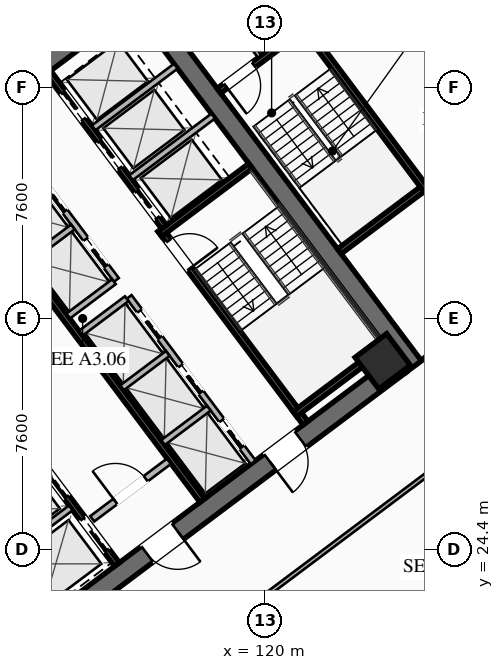
"""IFC4 building model, lengths in metres.
Left out: names, types, materials, properties, quantities, classifications, styles, units other than length and angle.
Written with IfcOpenShell. Run it as: python <this file> out.ifc"""

import sys

from ifc_helpers import new_model, si_unit, direction, frame, frame_2d, origin, origin_2d, place, context, subcontext, project, spatial, rectangle, hollow_rectangle, extrude, element, fill, save


model = new_model("IFC4")
c1 = context("Model", 3, precision=1e-05, world=origin(), true_north=direction((0.0, 1.0)))
c2 = subcontext(c1, "Body", "Model", "MODEL_VIEW")
j1 = project(units=[si_unit("LENGTHUNIT", "METRE"), si_unit("PLANEANGLEUNIT", "RADIAN")], contexts=[c1])
p1 = place(None, origin())
s1 = spatial("IfcSite", under=j1, at=p1, CompositionType="ELEMENT")
p2 = place(p1, origin())
s2 = spatial("IfcBuilding", under=s1, at=p2, CompositionType="ELEMENT")
p3 = place(p2, frame((0.0, 0.0, 106.25)))
s3 = spatial("IfcBuildingStorey", under=s2, at=p3, CompositionType="ELEMENT", Elevation=106.25)
p4 = place(p3, frame((115.524, 42.893, 0.0), z_axis=(0.0, 0.0, 1.0), x_axis=(0.600005007985, -0.799996243986, 0.0)))
e1 = element("IfcWall", 1, at=p4, inside=s3, PredefinedType="SHEAR", context=c2, shape_type="SweptSolid", body=[
    extrude(rectangle(XDim=15.6, YDim=0.65, at=frame_2d((7.8, 0.0))), origin(), (0.0, 0.0, 1.0), 3.55),
])
p5 = place(p3, frame((124.429, 30.478, 0.0), z_axis=(0.0, 0.0, 1.0), x_axis=(-0.799998028465, -0.600002628705, 0.0)))
e2 = element("IfcWall", 2, at=p5, inside=s3, PredefinedType="SHEAR", context=c2, shape_type="SweptSolid", body=[
    extrude(rectangle(XDim=14.86, YDim=0.65, at=frame_2d((7.43, 0.0))), origin(), (0.0, 0.0, 1.0), 3.55),
])
p6 = place(p5, frame((9.13, 0.0, 0.0)))
e3 = element("IfcOpeningElement", 3, at=p6, cuts=e2, PredefinedType="OPENING", context=c2, shape_type="SweptSolid", body=[
    extrude(rectangle(XDim=1.25, YDim=2.25, at=frame_2d((0.625, 1.125))), frame((0.0, 0.335, 0.0), z_axis=(0.0, -1.0, 0.0), x_axis=(1.0, 0.0, 0.0)), (0.0, 0.0, 1.0), 0.67),
])
p7 = place(p5, frame((4.08, 0.0, 0.0)))
e4 = element("IfcOpeningElement", 4, at=p7, cuts=e2, PredefinedType="OPENING", context=c2, shape_type="SweptSolid", body=[
    extrude(rectangle(XDim=1.25, YDim=2.25, at=frame_2d((0.625, 1.125))), frame((0.0, 0.335, 0.0), z_axis=(0.0, -1.0, 0.0), x_axis=(1.0, 0.0, 0.0)), (0.0, 0.0, 1.0), 0.67),
])
p8 = place(p3, frame((103.571, 33.522, 0.0), z_axis=(0.0, 0.0, 1.0), x_axis=(0.799998028465, 0.600002628705, 0.0)))
e5 = element("IfcWall", 5, at=p8, inside=s3, PredefinedType="SHEAR", context=c2, shape_type="SweptSolid", body=[
    extrude(rectangle(XDim=14.86, YDim=0.65, at=frame_2d((7.43, 0.0))), origin(), (0.0, 0.0, 1.0), 3.55),
])
p9 = place(p8, frame((4.48, 0.0, 0.0)))
e6 = element("IfcOpeningElement", 6, at=p9, cuts=e5, PredefinedType="OPENING", context=c2, shape_type="SweptSolid", body=[
    extrude(rectangle(XDim=1.25, YDim=2.25, at=frame_2d((0.625, 1.125))), frame((0.0, 0.335, 0.0), z_axis=(0.0, -1.0, 0.0), x_axis=(1.0, 0.0, 0.0)), (0.0, 0.0, 1.0), 0.67),
])
p10 = place(p8, frame((9.53, 0.0, 0.0)))
e7 = element("IfcOpeningElement", 7, at=p10, cuts=e5, PredefinedType="OPENING", context=c2, shape_type="SweptSolid", body=[
    extrude(rectangle(XDim=1.25, YDim=2.25, at=frame_2d((0.625, 1.125))), frame((0.0, 0.335, 0.0), z_axis=(0.0, -1.0, 0.0), x_axis=(1.0, 0.0, 0.0)), (0.0, 0.0, 1.0), 0.67),
])
p11 = place(p3, frame((123.87, 30.59, 0.0), z_axis=(0.0, 0.0, 1.0), x_axis=(0.799999996291, 0.600000004945, 0.0)))
e8 = element("IfcColumn", 8, at=p11, inside=s3, PredefinedType="COLUMN", context=c2, shape_type="SweptSolid", body=[
    extrude(hollow_rectangle(XDim=1.3, YDim=1.3, WallThickness=0.05, at=origin_2d()), origin(), (0.0, 0.0, 1.0), 3.25),
])
p12 = place(p3, frame((116.56, 34.92, 0.0), z_axis=(0.0, 0.0, 1.0), x_axis=(0.600009827119, -0.799992629566, 0.0)))
e9 = element("IfcWall", 9, at=p12, inside=s3, PredefinedType="SHEAR", context=c2, shape_type="SweptSolid", body=[
    extrude(rectangle(XDim=7.95, YDim=0.2, at=frame_2d((3.975, 0.0))), origin(), (0.0, 0.0, 1.0), 3.25),
])
p13 = place(p12, frame((0.45, 0.0, 0.0)))
e10 = element("IfcOpeningElement", 10, at=p13, cuts=e9, PredefinedType="OPENING", context=c2, shape_type="SweptSolid", body=[
    extrude(rectangle(XDim=1.15, YDim=2.2, at=frame_2d((0.575, 1.1))), frame((0.0, 0.11, 0.0), z_axis=(0.0, -1.0, 0.0), x_axis=(1.0, 0.0, 0.0)), (0.0, 0.0, 1.0), 0.22),
])
for number, where, z_axis, x_axis in (
    (11, (116.54, 34.78, 0.0), (0.0, 0.0, 1.0), (0.8, 0.6, 0.0)),
    (12, (120.98, 28.86, 0.0), (0.0, 0.0, 1.0), (0.8, 0.6, 0.0)),
):
    element("IfcWall", number, at=place(p3, frame(where, z_axis=z_axis, x_axis=x_axis)), inside=s3, PredefinedType="SHEAR", context=c2, shape_type="SweptSolid", body=[
        extrude(rectangle(XDim=3.73, YDim=0.2, at=frame_2d((1.865, 0.0))), origin(), (0.0, 0.0, 1.0), 3.25),
    ])
p14 = place(p3, frame((117.938, 26.016, 0.0), z_axis=(0.0, 0.0, 1.0), x_axis=(-0.600005463273, 0.799995902516, 0.0)))
e13 = element("IfcWall", 13, at=p14, inside=s3, PredefinedType="SHEAR", context=c2, shape_type="SweptSolid", body=[
    extrude(rectangle(XDim=14.3, YDim=0.2, at=frame_2d((7.15, 0.0))), origin(), (0.0, 0.0, 1.0), 3.25),
])
p15 = place(p3, frame((114.316, 25.412, 0.0), z_axis=(0.0, 0.0, 1.0), x_axis=(0.800018601094, 0.59997519774, 0.0)))
e14 = element("IfcWall", 14, at=p15, inside=s3, PredefinedType="SOLIDWALL", context=c2, shape_type="SweptSolid", body=[
    extrude(rectangle(XDim=3.15, YDim=0.22, at=frame_2d((1.575, 0.0))), origin(), (0.0, 0.0, 1.0), 2.393),
])
p16 = place(p15, frame((0.95, 0.0, 0.0)))
e15 = element("IfcOpeningElement", 15, at=p16, cuts=e14, PredefinedType="OPENING", context=c2, shape_type="SweptSolid", body=[
    extrude(rectangle(XDim=1.25, YDim=2.25, at=frame_2d((0.625, 1.125))), frame((0.0, 0.12, 0.0), z_axis=(0.0, -1.0, 0.0), x_axis=(1.0, 0.0, 0.0)), (0.0, 0.0, 1.0), 0.24),
])
p17 = place(p3, frame((115.13, 23.91, 0.0), z_axis=(0.0, 0.0, 1.0), x_axis=(-0.599975393228, 0.800018454488, 0.0)))
e16 = element("IfcWall", 16, at=p17, inside=s3, PredefinedType="SHEAR", context=c2, shape_type="SweptSolid", body=[
    extrude(rectangle(XDim=6.35, YDim=0.2, at=frame_2d((3.175, 0.0))), origin(), (0.0, 0.0, 1.0), 3.25),
])
p18 = place(p17, frame((4.775, 0.0, 0.0)))
e17 = element("IfcOpeningElement", 17, at=p18, cuts=e16, PredefinedType="OPENING", context=c2, shape_type="SweptSolid", body=[
    extrude(rectangle(XDim=1.3, YDim=2.25, at=frame_2d((0.65, 1.125))), frame((0.0, 0.11, 0.0), z_axis=(0.0, -1.0, 0.0), x_axis=(1.0, 0.0, 0.0)), (0.0, 0.0, 1.0), 0.22),
])
p19 = place(p17, frame((2.775, 0.0, 0.0)))
e18 = element("IfcOpeningElement", 18, at=p19, cuts=e16, PredefinedType="OPENING", context=c2, shape_type="SweptSolid", body=[
    extrude(rectangle(XDim=1.3, YDim=2.25, at=frame_2d((0.65, 1.125))), frame((0.0, 0.11, 0.0), z_axis=(0.0, -1.0, 0.0), x_axis=(1.0, 0.0, 0.0)), (0.0, 0.0, 1.0), 0.22),
])
p20 = place(p17, frame((0.575, 0.0, 0.0)))
e19 = element("IfcOpeningElement", 19, at=p20, cuts=e16, PredefinedType="OPENING", context=c2, shape_type="SweptSolid", body=[
    extrude(rectangle(XDim=1.3, YDim=2.25, at=frame_2d((0.65, 1.125))), frame((0.0, 0.11, 0.0), z_axis=(0.0, -1.0, 0.0), x_axis=(1.0, 0.0, 0.0)), (0.0, 0.0, 1.0), 0.22),
])
p21 = place(p3, frame((110.906, 23.742, 0.0), z_axis=(0.0, 0.0, 1.0), x_axis=(0.8, 0.6, 0.0)))
e20 = element("IfcWall", 20, at=p21, inside=s3, PredefinedType="SOLIDWALL", context=c2, shape_type="SweptSolid", body=[
    extrude(rectangle(XDim=3.38, YDim=0.2, at=frame_2d((1.69, 0.0))), origin(), (0.0, 0.0, 1.0), 3.25),
])
p22 = place(p3, frame((112.87, 40.09, 0.0), z_axis=(0.0, 0.0, 1.0), x_axis=(0.599975393228, -0.800018454488, 0.0)))
e21 = element("IfcWall", 21, at=p22, inside=s3, PredefinedType="SHEAR", context=c2, shape_type="SweptSolid", body=[
    extrude(rectangle(XDim=6.35, YDim=0.2, at=frame_2d((3.175, 0.0))), origin(), (0.0, 0.0, 1.0), 3.25),
])
p23 = place(p22, frame((4.875, 0.0, 0.0)))
e22 = element("IfcOpeningElement", 22, at=p23, cuts=e21, PredefinedType="OPENING", context=c2, shape_type="SweptSolid", body=[
    extrude(rectangle(XDim=1.1, YDim=2.2, at=frame_2d((0.55, 1.1))), frame((0.0, 0.11, 0.0), z_axis=(0.0, -1.0, 0.0), x_axis=(1.0, 0.0, 0.0)), (0.0, 0.0, 1.0), 0.22),
])
p24 = place(p22, frame((2.825, 0.0, 0.0)))
e23 = element("IfcOpeningElement", 23, at=p24, cuts=e21, PredefinedType="OPENING", context=c2, shape_type="SweptSolid", body=[
    extrude(rectangle(XDim=1.1, YDim=2.2, at=frame_2d((0.55, 1.1))), frame((0.0, 0.11, 0.0), z_axis=(0.0, -1.0, 0.0), x_axis=(1.0, 0.0, 0.0)), (0.0, 0.0, 1.0), 0.22),
])
p25 = place(p22, frame((0.825, 0.0, 0.0)))
e24 = element("IfcOpeningElement", 24, at=p25, cuts=e21, PredefinedType="OPENING", context=c2, shape_type="SweptSolid", body=[
    extrude(rectangle(XDim=1.1, YDim=2.2, at=frame_2d((0.55, 1.1))), frame((0.0, 0.11, 0.0), z_axis=(0.0, -1.0, 0.0), x_axis=(1.0, 0.0, 0.0)), (0.0, 0.0, 1.0), 0.22),
])
for number, where, z_axis, x_axis in (
    (25, (115.59, 36.63, 0.0), (0.0, 0.0, 1.0), (0.8, 0.6, 0.0)),
    (26, (114.36, 38.27, 0.0), (0.0, 0.0, 1.0), (0.8, 0.6, 0.0)),
):
    element("IfcWall", number, at=place(p3, frame(where, z_axis=z_axis, x_axis=x_axis)), inside=s3, PredefinedType="SOLIDWALL", context=c2, shape_type="SweptSolid", body=[
        extrude(rectangle(XDim=3.38, YDim=0.2, at=frame_2d((1.69, 0.0))), origin(), (0.0, 0.0, 1.0), 3.25),
    ])
p26 = place(p3, frame((119.61, 27.27, 0.0), z_axis=(0.0, 0.0, 1.0), x_axis=(-0.600011488909, 0.79999138319, 0.0)))
e27 = element("IfcWall", 27, at=p26, inside=s3, PredefinedType="SOLIDWALL", context=c2, shape_type="SweptSolid", body=[
    extrude(rectangle(XDim=6.8, YDim=0.2, at=frame_2d((3.4, 0.0))), origin(), (0.0, 0.0, 1.0), 3.25),
])
p27 = place(p26, frame((0.625, 0.0, 0.0)))
e28 = element("IfcOpeningElement", 28, at=p27, cuts=e27, PredefinedType="OPENING", context=c2, shape_type="SweptSolid", body=[
    extrude(rectangle(XDim=1.1, YDim=2.2, at=frame_2d((0.55, 1.1))), frame((0.0, 0.11, 0.0), z_axis=(0.0, -1.0, 0.0), x_axis=(1.0, 0.0, 0.0)), (0.0, 0.0, 1.0), 0.22),
])
p28 = place(p26, frame((2.875, 0.0, 0.0)))
e29 = element("IfcOpeningElement", 29, at=p28, cuts=e27, PredefinedType="OPENING", context=c2, shape_type="SweptSolid", body=[
    extrude(rectangle(XDim=1.1, YDim=2.2, at=frame_2d((0.55, 1.1))), frame((0.0, 0.11, 0.0), z_axis=(0.0, -1.0, 0.0), x_axis=(1.0, 0.0, 0.0)), (0.0, 0.0, 1.0), 0.22),
])
p29 = place(p26, frame((5.125, 0.0, 0.0)))
e30 = element("IfcOpeningElement", 30, at=p29, cuts=e27, PredefinedType="OPENING", context=c2, shape_type="SweptSolid", body=[
    extrude(rectangle(XDim=1.1, YDim=2.2, at=frame_2d((0.55, 1.1))), frame((0.0, 0.11, 0.0), z_axis=(0.0, -1.0, 0.0), x_axis=(1.0, 0.0, 0.0)), (0.0, 0.0, 1.0), 0.22),
])
p30 = place(p3, frame((116.646, 27.922, 0.0), z_axis=(0.0, 0.0, 1.0), x_axis=(0.8, 0.6, 0.0)))
e31 = element("IfcWall", 31, at=p30, inside=s3, PredefinedType="SOLIDWALL", context=c2, shape_type="SweptSolid", body=[
    extrude(rectangle(XDim=1.88, YDim=0.2, at=frame_2d((0.94, 0.0))), origin(), (0.0, 0.0, 1.0), 3.25),
])
p31 = place(p3, frame((115.296, 29.722, 0.0), z_axis=(0.0, 0.0, 1.0), x_axis=(0.799984418148, 0.600020775241, 0.0)))
e32 = element("IfcWall", 32, at=p31, inside=s3, PredefinedType="SOLIDWALL", context=c2, shape_type="SweptSolid", body=[
    extrude(rectangle(XDim=1.88, YDim=0.2, at=frame_2d((0.94, 0.0))), origin(), (0.0, 0.0, 1.0), 3.25),
])
p32 = place(p3, frame((113.946, 31.522, 0.0), z_axis=(0.0, 0.0, 1.0), x_axis=(0.8, 0.6, 0.0)))
e33 = element("IfcWall", 33, at=p32, inside=s3, PredefinedType="SOLIDWALL", context=c2, shape_type="SweptSolid", body=[
    extrude(rectangle(XDim=1.88, YDim=0.2, at=frame_2d((0.94, 0.0))), origin(), (0.0, 0.0, 1.0), 3.25),
])
p33 = place(p3, frame((115.11, 33.27, 0.0), z_axis=(0.0, 0.0, 1.0), x_axis=(-0.600011488909, 0.79999138319, 0.0)))
e34 = element("IfcWall", 34, at=p33, inside=s3, PredefinedType="SOLIDWALL", context=c2, shape_type="SweptSolid", body=[
    extrude(rectangle(XDim=6.8, YDim=0.2, at=frame_2d((3.4, 0.0))), origin(), (0.0, 0.0, 1.0), 3.25),
])
p34 = place(p33, frame((0.575, 0.0, 0.0)))
e35 = element("IfcOpeningElement", 35, at=p34, cuts=e34, PredefinedType="OPENING", context=c2, shape_type="SweptSolid", body=[
    extrude(rectangle(XDim=1.1, YDim=2.2, at=frame_2d((0.55, 1.1))), frame((0.0, 0.11, 0.0), z_axis=(0.0, -1.0, 0.0), x_axis=(1.0, 0.0, 0.0)), (0.0, 0.0, 1.0), 0.22),
])
p35 = place(p33, frame((2.825, 0.0, 0.0)))
e36 = element("IfcOpeningElement", 36, at=p35, cuts=e34, PredefinedType="OPENING", context=c2, shape_type="SweptSolid", body=[
    extrude(rectangle(XDim=1.1, YDim=2.2, at=frame_2d((0.55, 1.1))), frame((0.0, 0.11, 0.0), z_axis=(0.0, -1.0, 0.0), x_axis=(1.0, 0.0, 0.0)), (0.0, 0.0, 1.0), 0.22),
])
p36 = place(p33, frame((5.075, 0.0, 0.0)))
e37 = element("IfcOpeningElement", 37, at=p36, cuts=e34, PredefinedType="OPENING", context=c2, shape_type="SweptSolid", body=[
    extrude(rectangle(XDim=1.1, YDim=2.2, at=frame_2d((0.55, 1.1))), frame((0.0, 0.11, 0.0), z_axis=(0.0, -1.0, 0.0), x_axis=(1.0, 0.0, 0.0)), (0.0, 0.0, 1.0), 0.22),
])
p37 = place(p3, frame((113.526, 32.082, 0.0), z_axis=(0.0, 0.0, 1.0), x_axis=(0.800046745961, 0.599937666993, 0.0)))
e38 = element("IfcWall", 38, at=p37, inside=s3, PredefinedType="SOLIDWALL", context=c2, shape_type="SweptSolid", body=[
    extrude(rectangle(XDim=1.88, YDim=0.2, at=frame_2d((0.94, 0.0))), origin(), (0.0, 0.0, 1.0), 3.25),
])
p38 = place(p3, frame((112.176, 33.882, 0.0), z_axis=(0.0, 0.0, 1.0), x_axis=(0.8, 0.6, 0.0)))
e39 = element("IfcWall", 39, at=p38, inside=s3, PredefinedType="SOLIDWALL", context=c2, shape_type="SweptSolid", body=[
    extrude(rectangle(XDim=1.88, YDim=0.2, at=frame_2d((0.94, 0.0))), origin(), (0.0, 0.0, 1.0), 3.25),
])
p39 = place(p3, frame((125.304, 36.228, 0.0), z_axis=(0.0, 0.0, 1.0), x_axis=(-0.59998851072, 0.800008616831, 0.0)))
e40 = element("IfcWall", 40, at=p39, inside=s3, PredefinedType="SHEAR", context=c2, shape_type="SweptSolid", body=[
    extrude(rectangle(XDim=6.8, YDim=0.2, at=frame_2d((3.4, 0.0))), origin(), (0.0, 0.0, 1.0), 3.25),
])
p40 = place(p3, frame((121.204, 41.528, 0.0), z_axis=(0.0, 0.0, 1.0), x_axis=(-0.800017232136, -0.599977023131, 0.0)))
e41 = element("IfcWall", 41, at=p40, inside=s3, PredefinedType="SHEAR", context=c2, shape_type="SweptSolid", body=[
    extrude(rectangle(XDim=3.4, YDim=0.2, at=frame_2d((1.7, 0.0))), origin(), (0.0, 0.0, 1.0), 3.25),
])
p41 = place(p40, frame((1.975, 0.0, 0.0)))
e42 = element("IfcOpeningElement", 42, at=p41, cuts=e41, PredefinedType="OPENING", context=c2, shape_type="SweptSolid", body=[
    extrude(rectangle(XDim=1.15, YDim=2.2, at=frame_2d((0.575, 1.1))), frame((0.0, 0.11, 0.0), z_axis=(0.0, -1.0, 0.0), x_axis=(1.0, 0.0, 0.0)), (0.0, 0.0, 1.0), 0.22),
])
p42 = place(p3, frame((122.444, 34.208, 0.0), z_axis=(0.0, 0.0, 1.0), x_axis=(0.79999138319, 0.600011488909, 0.0)))
e43 = element("IfcWall", 43, at=p42, inside=s3, PredefinedType="SHEAR", context=c2, shape_type="SweptSolid", body=[
    extrude(rectangle(XDim=3.4, YDim=0.2, at=frame_2d((1.7, 0.0))), origin(), (0.0, 0.0, 1.0), 3.25),
])
p43 = place(p3, frame((119.824, 40.618, 0.0), z_axis=(0.0, 0.0, 1.0), x_axis=(-0.599982243973, 0.800013316712, 0.0)))
e44 = element("IfcWall", 44, at=p43, inside=s3, PredefinedType="PARTITIONING", context=c2, shape_type="SweptSolid", body=[
    extrude(rectangle(XDim=4.4, YDim=0.135, at=frame_2d((2.2, 0.0))), origin(), (0.0, 0.0, 1.0), 2.393),
])
p44 = place(p3, frame((98.276, 34.332, 0.0), z_axis=(0.0, 0.0, 1.0), x_axis=(0.800003113347, 0.599995848849, 0.0)))
e45 = element("IfcWall", 45, at=p44, inside=s3, PredefinedType="PARTITIONING", context=c2, shape_type="SweptSolid", body=[
    extrude(rectangle(XDim=28.23, YDim=0.135, at=frame_2d((14.115, 0.0))), origin(), (0.0, 0.0, 1.0), 2.393),
])
p45 = place(p44, frame((26.98, 0.0, 0.0)))
e46 = element("IfcOpeningElement", 46, at=p45, cuts=e45, PredefinedType="OPENING", context=c2, shape_type="SweptSolid", body=[
    extrude(rectangle(XDim=0.95, YDim=2.05, at=frame_2d((0.475, 1.025))), frame((0.0, 0.077, 0.0), z_axis=(0.0, -1.0, 0.0), x_axis=(1.0, 0.0, 0.0)), (0.0, 0.0, 1.0), 0.155),
])
p46 = place(p3, frame((134.18, 33.51, 0.0), z_axis=(0.0, 0.0, 1.0), x_axis=(-0.8, -0.6, 0.0)))
e47 = element("IfcWall", 47, at=p46, inside=s3, PredefinedType="PARTITIONING", context=c2, shape_type="SweptSolid", body=[
    extrude(rectangle(XDim=28.23, YDim=0.135, at=frame_2d((14.115, 0.0))), origin(), (0.0, 0.0, 1.0), 2.393),
])
p47 = place(p46, frame((25.637, 0.0, 0.0)))
e48 = element("IfcOpeningElement", 48, at=p47, cuts=e47, PredefinedType="OPENING", context=c2, shape_type="SweptSolid", body=[
    extrude(rectangle(XDim=0.95, YDim=2.05, at=frame_2d((0.475, 1.025))), frame((0.0, 0.077, 0.0), z_axis=(0.0, -1.0, 0.0), x_axis=(1.0, 0.0, 0.0)), (0.0, 0.0, 1.0), 0.155),
])
p48 = place(p46, frame((0.38, 0.0, 0.0)))
e49 = element("IfcOpeningElement", 49, at=p48, cuts=e47, PredefinedType="OPENING", context=c2, shape_type="SweptSolid", body=[
    extrude(rectangle(XDim=0.95, YDim=2.05, at=frame_2d((0.475, 1.025))), frame((0.0, 0.077, 0.0), z_axis=(0.0, -1.0, 0.0), x_axis=(1.0, 0.0, 0.0)), (0.0, 0.0, 1.0), 0.155),
])
p49 = place(p3, frame((125.208, 30.656, 0.0), z_axis=(0.0, 0.0, 1.0), x_axis=(0.8, 0.6, 0.0)))
e50 = element("IfcWall", 50, at=p49, inside=s3, PredefinedType="PARTITIONING", context=c2, shape_type="SweptSolid", body=[
    extrude(rectangle(XDim=11.72, YDim=0.135, at=frame_2d((5.86, 0.0))), origin(), (0.0, 0.0, 1.0), 2.393),
])
p50 = place(p49, frame((2.045, 0.0, 0.0)))
e51 = element("IfcOpeningElement", 51, at=p50, cuts=e50, PredefinedType="OPENING", context=c2, shape_type="SweptSolid", body=[
    extrude(rectangle(XDim=0.95, YDim=2.05, at=frame_2d((0.475, 1.025))), frame((0.0, 0.077, 0.0), z_axis=(0.0, -1.0, 0.0), x_axis=(1.0, 0.0, 0.0)), (0.0, 0.0, 1.0), 0.155),
])
p51 = place(p6, origin())
e52 = element("IfcDoor", 52, at=p51, inside=s3, OperationType="SINGLE_SWING_LEFT", PredefinedType="DOOR", context=c2, shape_type="SweptSolid", body=[
    extrude(rectangle(XDim=1.25, YDim=2.25, at=frame_2d((0.625, 1.125))), frame((0.0, 0.025, 0.0), z_axis=(0.0, -1.0, 0.0), x_axis=(1.0, 0.0, 0.0)), (0.0, 0.0, 1.0), 0.05),
])
fill(e3, e52)
p52 = place(p7, origin())
e53 = element("IfcDoor", 53, at=p52, inside=s3, OperationType="SINGLE_SWING_RIGHT", PredefinedType="DOOR", context=c2, shape_type="SweptSolid", body=[
    extrude(rectangle(XDim=1.25, YDim=2.25, at=frame_2d((0.625, 1.125))), frame((0.0, 0.025, 0.0), z_axis=(0.0, -1.0, 0.0), x_axis=(1.0, 0.0, 0.0)), (0.0, 0.0, 1.0), 0.05),
])
fill(e4, e53)
p53 = place(p13, origin())
e54 = element("IfcDoor", 54, at=p53, inside=s3, OperationType="SINGLE_SWING_RIGHT", PredefinedType="DOOR", context=c2, shape_type="SweptSolid", body=[
    extrude(rectangle(XDim=1.15, YDim=2.2, at=frame_2d((0.575, 1.1))), frame((0.0, 0.025, 0.0), z_axis=(0.0, -1.0, 0.0), x_axis=(1.0, 0.0, 0.0)), (0.0, 0.0, 1.0), 0.05),
])
fill(e10, e54)
p54 = place(p16, origin())
e55 = element("IfcDoor", 55, at=p54, inside=s3, OperationType="SINGLE_SWING_LEFT", PredefinedType="DOOR", context=c2, shape_type="SweptSolid", body=[
    extrude(rectangle(XDim=1.25, YDim=2.25, at=frame_2d((0.625, 1.125))), frame((0.0, 0.025, 0.0), z_axis=(0.0, -1.0, 0.0), x_axis=(1.0, 0.0, 0.0)), (0.0, 0.0, 1.0), 0.05),
])
fill(e15, e55)
p55 = place(p41, origin())
e56 = element("IfcDoor", 56, at=p55, inside=s3, OperationType="SINGLE_SWING_RIGHT", PredefinedType="DOOR", context=c2, shape_type="SweptSolid", body=[
    extrude(rectangle(XDim=1.15, YDim=2.2, at=frame_2d((0.575, 1.1))), frame((0.0, 0.025, 0.0), z_axis=(0.0, -1.0, 0.0), x_axis=(1.0, 0.0, 0.0)), (0.0, 0.0, 1.0), 0.05),
])
fill(e42, e56)
p56 = place(p19, origin())
e57 = element("IfcDoor", 57, at=p56, inside=s3, OperationType="SLIDING_TO_LEFT", PredefinedType="DOOR", context=c2, shape_type="SweptSolid", body=[
    extrude(rectangle(XDim=1.3, YDim=2.25, at=frame_2d((0.65, 1.125))), frame((0.0, 0.025, 0.0), z_axis=(0.0, -1.0, 0.0), x_axis=(1.0, 0.0, 0.0)), (0.0, 0.0, 1.0), 0.05),
])
fill(e18, e57)
p57 = place(p20, origin())
e58 = element("IfcDoor", 58, at=p57, inside=s3, OperationType="SLIDING_TO_LEFT", PredefinedType="DOOR", context=c2, shape_type="SweptSolid", body=[
    extrude(rectangle(XDim=1.3, YDim=2.25, at=frame_2d((0.65, 1.125))), frame((0.0, 0.025, 0.0), z_axis=(0.0, -1.0, 0.0), x_axis=(1.0, 0.0, 0.0)), (0.0, 0.0, 1.0), 0.05),
])
fill(e19, e58)
p58 = place(p27, origin())
e59 = element("IfcDoor", 59, at=p58, inside=s3, OperationType="SLIDING_TO_LEFT", PredefinedType="DOOR", context=c2, shape_type="SweptSolid", body=[
    extrude(rectangle(XDim=1.1, YDim=2.2, at=frame_2d((0.55, 1.1))), frame((0.0, 0.025, 0.0), z_axis=(0.0, -1.0, 0.0), x_axis=(1.0, 0.0, 0.0)), (0.0, 0.0, 1.0), 0.05),
])
fill(e28, e59)
p59 = place(p28, origin())
e60 = element("IfcDoor", 60, at=p59, inside=s3, OperationType="SLIDING_TO_LEFT", PredefinedType="DOOR", context=c2, shape_type="SweptSolid", body=[
    extrude(rectangle(XDim=1.1, YDim=2.2, at=frame_2d((0.55, 1.1))), frame((0.0, 0.025, 0.0), z_axis=(0.0, -1.0, 0.0), x_axis=(1.0, 0.0, 0.0)), (0.0, 0.0, 1.0), 0.05),
])
fill(e29, e60)
p60 = place(p29, origin())
e61 = element("IfcDoor", 61, at=p60, inside=s3, OperationType="SLIDING_TO_LEFT", PredefinedType="DOOR", context=c2, shape_type="SweptSolid", body=[
    extrude(rectangle(XDim=1.1, YDim=2.2, at=frame_2d((0.55, 1.1))), frame((0.0, 0.025, 0.0), z_axis=(0.0, -1.0, 0.0), x_axis=(1.0, 0.0, 0.0)), (0.0, 0.0, 1.0), 0.05),
])
fill(e30, e61)
p61 = place(p34, origin())
e62 = element("IfcDoor", 62, at=p61, inside=s3, OperationType="SLIDING_TO_LEFT", PredefinedType="DOOR", context=c2, shape_type="SweptSolid", body=[
    extrude(rectangle(XDim=1.1, YDim=2.2, at=frame_2d((0.55, 1.1))), frame((0.0, 0.025, 0.0), z_axis=(0.0, -1.0, 0.0), x_axis=(1.0, 0.0, 0.0)), (0.0, 0.0, 1.0), 0.05),
])
fill(e35, e62)
p62 = place(p35, origin())
e63 = element("IfcDoor", 63, at=p62, inside=s3, OperationType="SLIDING_TO_LEFT", PredefinedType="DOOR", context=c2, shape_type="SweptSolid", body=[
    extrude(rectangle(XDim=1.1, YDim=2.2, at=frame_2d((0.55, 1.1))), frame((0.0, 0.025, 0.0), z_axis=(0.0, -1.0, 0.0), x_axis=(1.0, 0.0, 0.0)), (0.0, 0.0, 1.0), 0.05),
])
fill(e36, e63)
p63 = place(p23, origin())
e64 = element("IfcDoor", 64, at=p63, inside=s3, OperationType="SLIDING_TO_LEFT", PredefinedType="DOOR", context=c2, shape_type="SweptSolid", body=[
    extrude(rectangle(XDim=1.1, YDim=2.2, at=frame_2d((0.55, 1.1))), frame((0.0, 0.025, 0.0), z_axis=(0.0, -1.0, 0.0), x_axis=(1.0, 0.0, 0.0)), (0.0, 0.0, 1.0), 0.05),
])
fill(e22, e64)
p64 = place(p24, origin())
e65 = element("IfcDoor", 65, at=p64, inside=s3, OperationType="SLIDING_TO_LEFT", PredefinedType="DOOR", context=c2, shape_type="SweptSolid", body=[
    extrude(rectangle(XDim=1.1, YDim=2.2, at=frame_2d((0.55, 1.1))), frame((0.0, 0.025, 0.0), z_axis=(0.0, -1.0, 0.0), x_axis=(1.0, 0.0, 0.0)), (0.0, 0.0, 1.0), 0.05),
])
fill(e23, e65)
p65 = place(p25, origin())
e66 = element("IfcDoor", 66, at=p65, inside=s3, OperationType="SLIDING_TO_LEFT", PredefinedType="DOOR", context=c2, shape_type="SweptSolid", body=[
    extrude(rectangle(XDim=1.1, YDim=2.2, at=frame_2d((0.55, 1.1))), frame((0.0, 0.025, 0.0), z_axis=(0.0, -1.0, 0.0), x_axis=(1.0, 0.0, 0.0)), (0.0, 0.0, 1.0), 0.05),
])
fill(e24, e66)
save(model, sys.argv[1])
